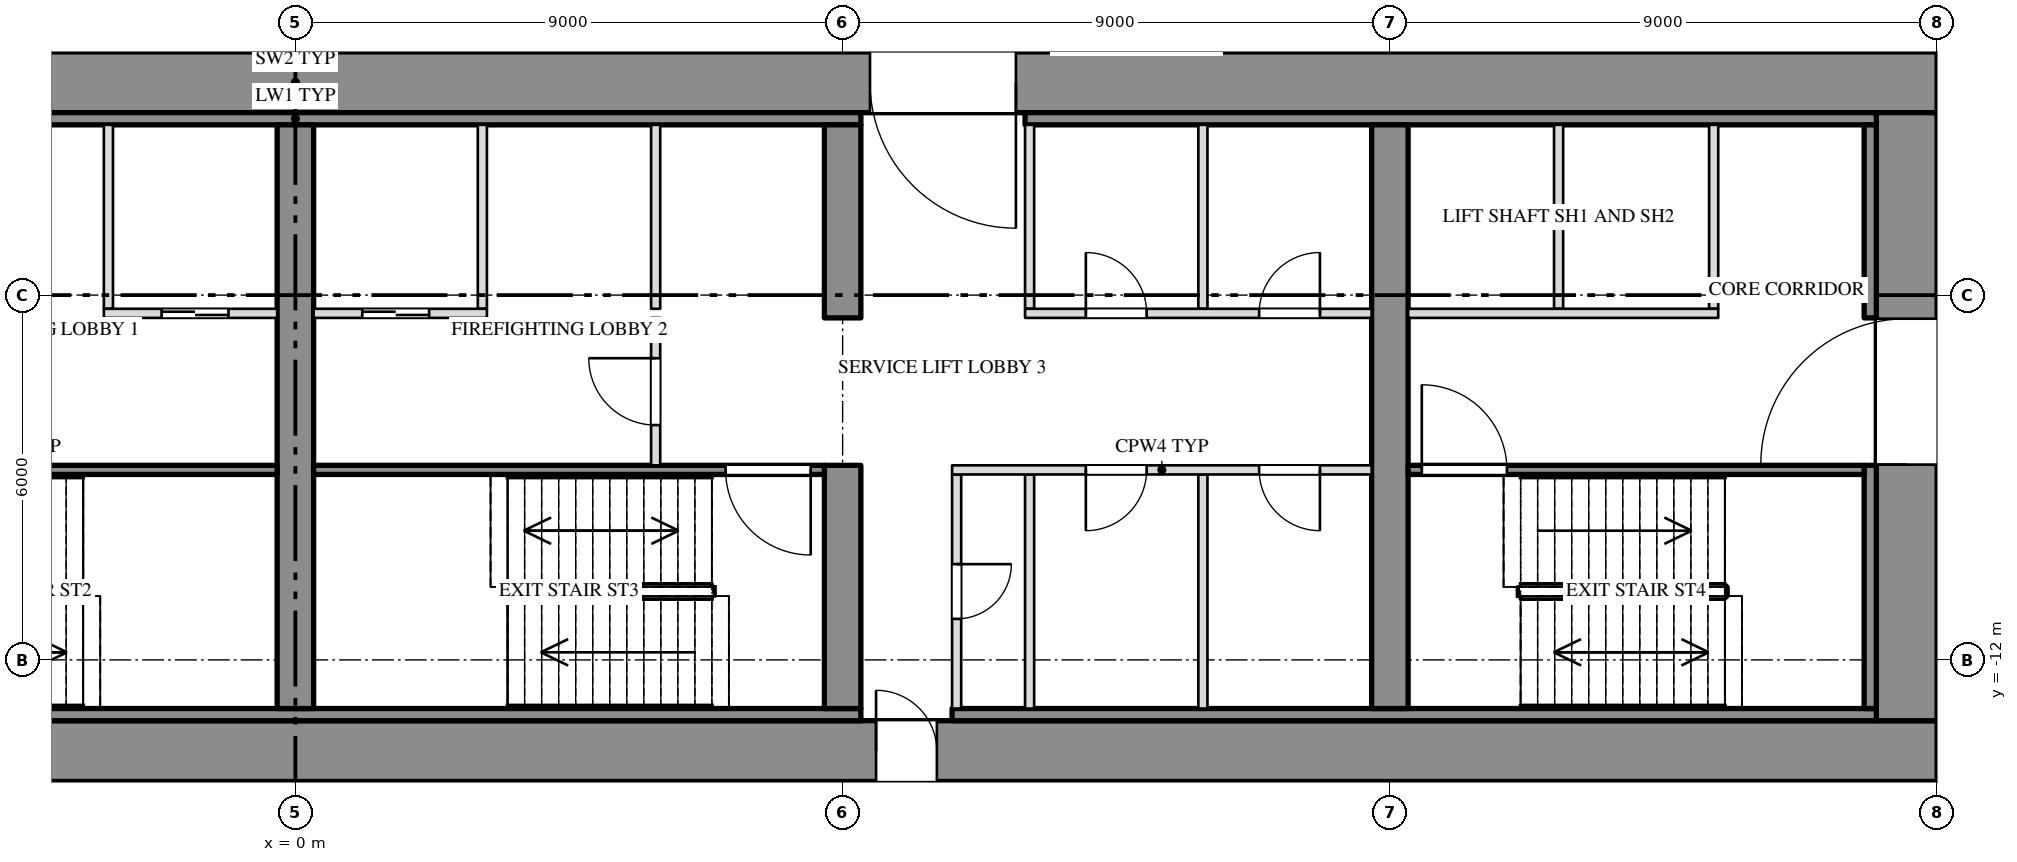
"""IFC4 building model, lengths in metres.
Left out: names, types, materials, properties, quantities, classifications, styles, units other than length and angle.
Written with IfcOpenShell. Run it as: python <this file> out.ifc"""

import sys

from ifc_helpers import new_model, si_unit, direction, frame, frame_2d, origin, place, context, subcontext, project, spatial, rectangle, extrude, element, fill, save


model = new_model("IFC4")
c1 = context("Model", 3, precision=1e-05, world=origin(), true_north=direction((0.0, 1.0)))
c2 = subcontext(c1, "Body", "Model", "MODEL_VIEW")
j1 = project(units=[si_unit("LENGTHUNIT", "METRE"), si_unit("PLANEANGLEUNIT", "RADIAN")], contexts=[c1])
p1 = place(None, origin())
s1 = spatial("IfcSite", under=j1, at=p1, CompositionType="ELEMENT")
p2 = place(p1, origin())
s2 = spatial("IfcBuilding", under=s1, at=p2, CompositionType="ELEMENT")
p3 = place(p2, frame((0.0, 0.0, 104.5)))
s3 = spatial("IfcBuildingStorey", under=s2, at=p3, CompositionType="ELEMENT", Elevation=104.5)
p4 = place(p3, frame((-27.0, -2.5, 0.0), z_axis=(0.0, 0.0, 1.0), x_axis=(1.0, 0.0, 0.0)))
e1 = element("IfcWall", 1, at=p4, inside=s3, PredefinedType="SHEAR", context=c2, shape_type="SweptSolid", body=[
    extrude(rectangle(XDim=54.0, YDim=1.0, at=frame_2d((27.0, 0.0))), origin(), (0.0, 0.0, 1.0), 3.8),
])
p5 = place(p4, frame((15.15, 0.0, 0.0)))
e2 = element("IfcOpeningElement", 2, at=p5, cuts=e1, PredefinedType="OPENING", context=c2, shape_type="SweptSolid", body=[
    extrude(rectangle(XDim=2.4, YDim=2.1, at=frame_2d((1.2, 1.05))), frame((0.0, 0.512, 0.0), z_axis=(0.0, -1.0, 0.0), x_axis=(1.0, 0.0, 0.0)), (0.0, 0.0, 1.0), 1.024),
])
p6 = place(p4, frame((36.45, 0.0, 0.0)))
e3 = element("IfcOpeningElement", 3, at=p6, cuts=e1, PredefinedType="OPENING", context=c2, shape_type="SweptSolid", body=[
    extrude(rectangle(XDim=2.4, YDim=2.1, at=frame_2d((1.2, 1.05))), frame((0.0, 0.512, 0.0), z_axis=(0.0, -1.0, 0.0), x_axis=(1.0, 0.0, 0.0)), (0.0, 0.0, 1.0), 1.024),
])
p7 = place(p3, frame((-27.0, -13.5, 0.0), z_axis=(0.0, 0.0, 1.0), x_axis=(1.0, 0.0, 0.0)))
e4 = element("IfcWall", 4, at=p7, inside=s3, PredefinedType="SHEAR", context=c2, shape_type="SweptSolid", body=[
    extrude(rectangle(XDim=54.0, YDim=1.0, at=frame_2d((27.0, 0.0))), origin(), (0.0, 0.0, 1.0), 3.8),
])
p8 = place(p7, frame((16.45, 0.0, 0.0)))
e5 = element("IfcOpeningElement", 5, at=p8, cuts=e4, PredefinedType="OPENING", context=c2, shape_type="SweptSolid", body=[
    extrude(rectangle(XDim=1.0, YDim=2.1, at=frame_2d((0.5, 1.05))), frame((0.0, 0.512, 0.0), z_axis=(0.0, -1.0, 0.0), x_axis=(1.0, 0.0, 0.0)), (0.0, 0.0, 1.0), 1.024),
])
p9 = place(p7, frame((36.55, 0.0, 0.0)))
e6 = element("IfcOpeningElement", 6, at=p9, cuts=e4, PredefinedType="OPENING", context=c2, shape_type="SweptSolid", body=[
    extrude(rectangle(XDim=1.0, YDim=2.1, at=frame_2d((0.5, 1.05))), frame((0.0, 0.512, 0.0), z_axis=(0.0, -1.0, 0.0), x_axis=(1.0, 0.0, 0.0)), (0.0, 0.0, 1.0), 1.024),
])
p10 = place(p3, frame((26.5, -13.0, 0.0), z_axis=(0.0, 0.0, 1.0), x_axis=(0.0, 1.0, 0.0)))
e7 = element("IfcWall", 7, at=p10, inside=s3, PredefinedType="SHEAR", context=c2, shape_type="SweptSolid", body=[
    extrude(rectangle(XDim=10.0, YDim=1.0, at=frame_2d((5.0, 0.0))), origin(), (0.0, 0.0, 1.0), 3.8),
])
p11 = place(p10, frame((4.212, 0.0, 0.0)))
e8 = element("IfcOpeningElement", 8, at=p11, cuts=e7, PredefinedType="OPENING", context=c2, shape_type="SweptSolid", body=[
    extrude(rectangle(XDim=2.4, YDim=2.1, at=frame_2d((1.2, 1.05))), frame((0.0, 0.512, 0.0), z_axis=(0.0, -1.0, 0.0), x_axis=(1.0, 0.0, 0.0)), (0.0, 0.0, 1.0), 1.024),
])
p12 = place(p3, frame((-9.3, -3.1, 0.0), z_axis=(0.0, 0.0, 1.0), x_axis=(1.0, 0.0, 0.0)))
e9 = element("IfcWall", 9, at=p12, inside=s3, PredefinedType="SHEAR", context=c2, shape_type="SweptSolid", body=[
    extrude(rectangle(XDim=18.6, YDim=0.2, at=frame_2d((9.3, 0.0))), origin(), (0.0, 0.0, 1.0), 3.8),
])
p13 = place(p3, frame((12.0, -3.1, 0.0), z_axis=(0.0, 0.0, 1.0), x_axis=(1.0, 0.0, 0.0)))
e10 = element("IfcWall", 10, at=p13, inside=s3, PredefinedType="SHEAR", context=c2, shape_type="SweptSolid", body=[
    extrude(rectangle(XDim=14.0, YDim=0.2, at=frame_2d((7.0, 0.0))), origin(), (0.0, 0.0, 1.0), 3.8),
])
p14 = place(p3, frame((-9.3, -12.9, 0.0), z_axis=(0.0, 0.0, 1.0), x_axis=(1.0, 0.0, 0.0)))
e11 = element("IfcWall", 11, at=p14, inside=s3, PredefinedType="SHEAR", context=c2, shape_type="SweptSolid", body=[
    extrude(rectangle(XDim=18.6, YDim=0.2, at=frame_2d((9.3, 0.0))), origin(), (0.0, 0.0, 1.0), 3.8),
])
p15 = place(p3, frame((10.8, -12.9, 0.0), z_axis=(0.0, 0.0, 1.0), x_axis=(1.0, 0.0, 0.0)))
e12 = element("IfcWall", 12, at=p15, inside=s3, PredefinedType="SHEAR", context=c2, shape_type="SweptSolid", body=[
    extrude(rectangle(XDim=15.2, YDim=0.2, at=frame_2d((7.6, 0.0))), origin(), (0.0, 0.0, 1.0), 3.8),
])
p16 = place(p3, frame((25.9, -12.8, 0.0), z_axis=(0.0, 0.0, 1.0), x_axis=(0.0, 1.0, 0.0)))
e13 = element("IfcWall", 13, at=p16, inside=s3, PredefinedType="SHEAR", context=c2, shape_type="SweptSolid", body=[
    extrude(rectangle(XDim=4.0, YDim=0.2, at=frame_2d((2.0, 0.0))), origin(), (0.0, 0.0, 1.0), 3.8),
])
p17 = place(p3, frame((25.9, -6.375, 0.0), z_axis=(0.0, 0.0, 1.0), x_axis=(0.0, 1.0, 0.0)))
e14 = element("IfcWall", 14, at=p17, inside=s3, PredefinedType="SHEAR", context=c2, shape_type="SweptSolid", body=[
    extrude(rectangle(XDim=3.175, YDim=0.2, at=frame_2d((1.587, 0.0))), origin(), (0.0, 0.0, 1.0), 3.8),
])
p18 = place(p3, frame((0.0, -12.8, 0.0), z_axis=(0.0, 0.0, 1.0), x_axis=(0.0, 1.0, 0.0)))
e15 = element("IfcWall", 15, at=p18, inside=s3, PredefinedType="SHEAR", context=c2, shape_type="SweptSolid", body=[
    extrude(rectangle(XDim=9.6, YDim=0.6, at=frame_2d((4.8, 0.0))), origin(), (0.0, 0.0, 1.0), 3.8),
])
p19 = place(p3, frame((9.0, -12.8, 0.0), z_axis=(0.0, 0.0, 1.0), x_axis=(0.0, 1.0, 0.0)))
e16 = element("IfcWall", 16, at=p19, inside=s3, PredefinedType="SHEAR", context=c2, shape_type="SweptSolid", body=[
    extrude(rectangle(XDim=4.0, YDim=0.6, at=frame_2d((2.0, 0.0))), origin(), (0.0, 0.0, 1.0), 3.8),
])
p20 = place(p3, frame((9.0, -6.375, 0.0), z_axis=(0.0, 0.0, 1.0), x_axis=(0.0, 1.0, 0.0)))
e17 = element("IfcWall", 17, at=p20, inside=s3, PredefinedType="SHEAR", context=c2, shape_type="SweptSolid", body=[
    extrude(rectangle(XDim=3.175, YDim=0.6, at=frame_2d((1.587, 0.0))), origin(), (0.0, 0.0, 1.0), 3.8),
])
p21 = place(p3, frame((18.0, -12.8, 0.0), z_axis=(0.0, 0.0, 1.0), x_axis=(0.0, 1.0, 0.0)))
e18 = element("IfcWall", 18, at=p21, inside=s3, PredefinedType="SHEAR", context=c2, shape_type="SweptSolid", body=[
    extrude(rectangle(XDim=9.6, YDim=0.6, at=frame_2d((4.8, 0.0))), origin(), (0.0, 0.0, 1.0), 3.8),
])
for number, where, z_axis, x_axis in (
    (19, (-3.075, -6.225, 0.0), (0.0, 0.0, 1.0), (0.0, 1.0, 0.0)),
    (20, (3.075, -6.225, 0.0), (0.0, 0.0, 1.0), (0.0, 1.0, 0.0)),
    (21, (5.925, -6.225, 0.0), (0.0, 0.0, 1.0), (0.0, 1.0, 0.0)),
    (22, (12.075, -6.225, 0.0), (0.0, 0.0, 1.0), (0.0, 1.0, 0.0)),
    (23, (14.925, -6.225, 0.0), (0.0, 0.0, 1.0), (0.0, 1.0, 0.0)),
    (24, (20.775, -6.225, 0.0), (0.0, 0.0, 1.0), (0.0, 1.0, 0.0)),
    (25, (23.325, -6.225, 0.0), (0.0, 0.0, 1.0), (0.0, 1.0, 0.0)),
):
    element("IfcWall", number, at=place(p3, frame(where, z_axis=z_axis, x_axis=x_axis)), inside=s3, PredefinedType="PARTITIONING", context=c2, shape_type="SweptSolid", body=[
        extrude(rectangle(XDim=3.025, YDim=0.15, at=frame_2d((1.513, 0.0))), origin(), (0.0, 0.0, 1.0), 3.8),
    ])
p22 = place(p3, frame((10.875, -12.8, 0.0), z_axis=(0.0, 0.0, 1.0), x_axis=(0.0, 1.0, 0.0)))
e26 = element("IfcWall", 26, at=p22, inside=s3, PredefinedType="PARTITIONING", context=c2, shape_type="SweptSolid", body=[
    extrude(rectangle(XDim=3.85, YDim=0.15, at=frame_2d((1.925, 0.0))), origin(), (0.0, 0.0, 1.0), 3.8),
])
p23 = place(p22, frame((1.475, 0.0, 0.0)))
e27 = element("IfcOpeningElement", 27, at=p23, cuts=e26, PredefinedType="OPENING", context=c2, shape_type="SweptSolid", body=[
    extrude(rectangle(XDim=0.9, YDim=2.1, at=frame_2d((0.45, 1.05))), frame((0.0, 0.087, 0.0), z_axis=(0.0, -1.0, 0.0), x_axis=(1.0, 0.0, 0.0)), (0.0, 0.0, 1.0), 0.174),
])
for number, where, z_axis, x_axis in (
    (28, (12.075, -12.8, 0.0), (0.0, 0.0, 1.0), (0.0, 1.0, 0.0)),
    (29, (14.925, -12.8, 0.0), (0.0, 0.0, 1.0), (0.0, 1.0, 0.0)),
):
    element("IfcWall", number, at=place(p3, frame(where, z_axis=z_axis, x_axis=x_axis)), inside=s3, PredefinedType="PARTITIONING", context=c2, shape_type="SweptSolid", body=[
        extrude(rectangle(XDim=3.85, YDim=0.15, at=frame_2d((1.925, 0.0))), origin(), (0.0, 0.0, 1.0), 3.8),
    ])
p24 = place(p3, frame((5.925, -8.8, 0.0), z_axis=(0.0, 0.0, 1.0), x_axis=(0.0, 1.0, 0.0)))
e30 = element("IfcWall", 30, at=p24, inside=s3, PredefinedType="PARTITIONING", context=c2, shape_type="SweptSolid", body=[
    extrude(rectangle(XDim=2.425, YDim=0.15, at=frame_2d((1.212, 0.0))), origin(), (0.0, 0.0, 1.0), 3.8),
])
p25 = place(p24, frame((0.662, 0.0, 0.0)))
e31 = element("IfcOpeningElement", 31, at=p25, cuts=e30, PredefinedType="OPENING", context=c2, shape_type="SweptSolid", body=[
    extrude(rectangle(XDim=1.1, YDim=2.1, at=frame_2d((0.55, 1.05))), frame((0.0, 0.087, 0.0), z_axis=(0.0, -1.0, 0.0), x_axis=(1.0, 0.0, 0.0)), (0.0, 0.0, 1.0), 0.174),
])
p26 = place(p3, frame((-3.15, -6.3, 0.0), z_axis=(0.0, 0.0, 1.0), x_axis=(1.0, 0.0, 0.0)))
e32 = element("IfcWall", 32, at=p26, inside=s3, PredefinedType="PARTITIONING", context=c2, shape_type="SweptSolid", body=[
    extrude(rectangle(XDim=2.85, YDim=0.15, at=frame_2d((1.425, 0.0))), origin(), (0.0, 0.0, 1.0), 3.8),
])
p27 = place(p26, frame((0.95, 0.0, 0.0)))
e33 = element("IfcOpeningElement", 33, at=p27, cuts=e32, PredefinedType="OPENING", context=c2, shape_type="SweptSolid", body=[
    extrude(rectangle(XDim=1.1, YDim=2.1, at=frame_2d((0.55, 1.05))), frame((0.0, 0.087, 0.0), z_axis=(0.0, -1.0, 0.0), x_axis=(1.0, 0.0, 0.0)), (0.0, 0.0, 1.0), 0.174),
])
p28 = place(p3, frame((0.3, -6.3, 0.0), z_axis=(0.0, 0.0, 1.0), x_axis=(1.0, 0.0, 0.0)))
e34 = element("IfcWall", 34, at=p28, inside=s3, PredefinedType="PARTITIONING", context=c2, shape_type="SweptSolid", body=[
    extrude(rectangle(XDim=2.85, YDim=0.15, at=frame_2d((1.425, 0.0))), origin(), (0.0, 0.0, 1.0), 3.8),
])
p29 = place(p28, frame((0.8, 0.0, 0.0)))
e35 = element("IfcOpeningElement", 35, at=p29, cuts=e34, PredefinedType="OPENING", context=c2, shape_type="SweptSolid", body=[
    extrude(rectangle(XDim=1.1, YDim=2.1, at=frame_2d((0.55, 1.05))), frame((0.0, 0.087, 0.0), z_axis=(0.0, -1.0, 0.0), x_axis=(1.0, 0.0, 0.0)), (0.0, 0.0, 1.0), 0.174),
])
p30 = place(p3, frame((12.0, -6.3, 0.0), z_axis=(0.0, 0.0, 1.0), x_axis=(1.0, 0.0, 0.0)))
e36 = element("IfcWall", 36, at=p30, inside=s3, PredefinedType="PARTITIONING", context=c2, shape_type="SweptSolid", body=[
    extrude(rectangle(XDim=5.7, YDim=0.15, at=frame_2d((2.85, 0.0))), origin(), (0.0, 0.0, 1.0), 3.8),
])
p31 = place(p30, frame((1.0, 0.0, 0.0)))
e37 = element("IfcOpeningElement", 37, at=p31, cuts=e36, PredefinedType="OPENING", context=c2, shape_type="SweptSolid", body=[
    extrude(rectangle(XDim=1.0, YDim=2.1, at=frame_2d((0.5, 1.05))), frame((0.0, 0.087, 0.0), z_axis=(0.0, -1.0, 0.0), x_axis=(1.0, 0.0, 0.0)), (0.0, 0.0, 1.0), 0.174),
])
p32 = place(p30, frame((3.85, 0.0, 0.0)))
e38 = element("IfcOpeningElement", 38, at=p32, cuts=e36, PredefinedType="OPENING", context=c2, shape_type="SweptSolid", body=[
    extrude(rectangle(XDim=1.0, YDim=2.1, at=frame_2d((0.5, 1.05))), frame((0.0, 0.087, 0.0), z_axis=(0.0, -1.0, 0.0), x_axis=(1.0, 0.0, 0.0)), (0.0, 0.0, 1.0), 0.174),
])
p33 = place(p3, frame((18.3, -6.3, 0.0), z_axis=(0.0, 0.0, 1.0), x_axis=(1.0, 0.0, 0.0)))
e39 = element("IfcWall", 39, at=p33, inside=s3, PredefinedType="PARTITIONING", context=c2, shape_type="SweptSolid", body=[
    extrude(rectangle(XDim=5.1, YDim=0.15, at=frame_2d((2.55, 0.0))), origin(), (0.0, 0.0, 1.0), 3.8),
])
p34 = place(p3, frame((-8.7, -8.875, 0.0), z_axis=(0.0, 0.0, 1.0), x_axis=(1.0, 0.0, 0.0)))
e40 = element("IfcWall", 40, at=p34, inside=s3, PredefinedType="SHEAR", context=c2, shape_type="SweptSolid", body=[
    extrude(rectangle(XDim=8.4, YDim=0.15, at=frame_2d((4.2, 0.0))), origin(), (0.0, 0.0, 1.0), 3.8),
])
p35 = place(p34, frame((0.225, 0.0, 0.0)))
e41 = element("IfcOpeningElement", 41, at=p35, cuts=e40, PredefinedType="OPENING", context=c2, shape_type="SweptSolid", body=[
    extrude(rectangle(XDim=1.4, YDim=2.1, at=frame_2d((0.7, 1.05))), frame((0.0, 0.087, 0.0), z_axis=(0.0, -1.0, 0.0), x_axis=(1.0, 0.0, 0.0)), (0.0, 0.0, 1.0), 0.174),
])
p36 = place(p3, frame((0.3, -8.875, 0.0), z_axis=(0.0, 0.0, 1.0), x_axis=(1.0, 0.0, 0.0)))
e42 = element("IfcWall", 42, at=p36, inside=s3, PredefinedType="SHEAR", context=c2, shape_type="SweptSolid", body=[
    extrude(rectangle(XDim=8.4, YDim=0.15, at=frame_2d((4.2, 0.0))), origin(), (0.0, 0.0, 1.0), 3.8),
])
p37 = place(p36, frame((6.775, 0.0, 0.0)))
e43 = element("IfcOpeningElement", 43, at=p37, cuts=e42, PredefinedType="OPENING", context=c2, shape_type="SweptSolid", body=[
    extrude(rectangle(XDim=1.4, YDim=2.1, at=frame_2d((0.7, 1.05))), frame((0.0, 0.087, 0.0), z_axis=(0.0, -1.0, 0.0), x_axis=(1.0, 0.0, 0.0)), (0.0, 0.0, 1.0), 0.174),
])
p38 = place(p3, frame((10.8, -8.875, 0.0), z_axis=(0.0, 0.0, 1.0), x_axis=(1.0, 0.0, 0.0)))
e44 = element("IfcWall", 44, at=p38, inside=s3, PredefinedType="PARTITIONING", context=c2, shape_type="SweptSolid", body=[
    extrude(rectangle(XDim=6.9, YDim=0.15, at=frame_2d((3.45, 0.0))), origin(), (0.0, 0.0, 1.0), 3.8),
])
p39 = place(p38, frame((2.2, 0.0, 0.0)))
e45 = element("IfcOpeningElement", 45, at=p39, cuts=e44, PredefinedType="OPENING", context=c2, shape_type="SweptSolid", body=[
    extrude(rectangle(XDim=1.0, YDim=2.1, at=frame_2d((0.5, 1.05))), frame((0.0, 0.087, 0.0), z_axis=(0.0, -1.0, 0.0), x_axis=(1.0, 0.0, 0.0)), (0.0, 0.0, 1.0), 0.174),
])
p40 = place(p38, frame((5.05, 0.0, 0.0)))
e46 = element("IfcOpeningElement", 46, at=p40, cuts=e44, PredefinedType="OPENING", context=c2, shape_type="SweptSolid", body=[
    extrude(rectangle(XDim=1.0, YDim=2.1, at=frame_2d((0.5, 1.05))), frame((0.0, 0.087, 0.0), z_axis=(0.0, -1.0, 0.0), x_axis=(1.0, 0.0, 0.0)), (0.0, 0.0, 1.0), 0.174),
])
p41 = place(p3, frame((18.3, -8.875, 0.0), z_axis=(0.0, 0.0, 1.0), x_axis=(1.0, 0.0, 0.0)))
e47 = element("IfcWall", 47, at=p41, inside=s3, PredefinedType="SHEAR", context=c2, shape_type="SweptSolid", body=[
    extrude(rectangle(XDim=7.5, YDim=0.15, at=frame_2d((3.75, 0.0))), origin(), (0.0, 0.0, 1.0), 3.8),
])
p42 = place(p41, frame((0.225, 0.0, 0.0)))
e48 = element("IfcOpeningElement", 48, at=p42, cuts=e47, PredefinedType="OPENING", context=c2, shape_type="SweptSolid", body=[
    extrude(rectangle(XDim=1.4, YDim=2.1, at=frame_2d((0.7, 1.05))), frame((0.0, 0.087, 0.0), z_axis=(0.0, -1.0, 0.0), x_axis=(1.0, 0.0, 0.0)), (0.0, 0.0, 1.0), 0.174),
])
p43 = place(p27, origin())
e49 = element("IfcDoor", 49, at=p43, inside=s3, OperationType="SLIDING_TO_RIGHT", PredefinedType="DOOR", context=c2, shape_type="SweptSolid", body=[
    extrude(rectangle(XDim=1.1, YDim=2.1, at=frame_2d((0.55, 1.05))), frame((0.0, 0.025, 0.0), z_axis=(0.0, -1.0, 0.0), x_axis=(1.0, 0.0, 0.0)), (0.0, 0.0, 1.0), 0.05),
])
fill(e33, e49)
p44 = place(p29, origin())
e50 = element("IfcDoor", 50, at=p44, inside=s3, OperationType="SLIDING_TO_LEFT", PredefinedType="DOOR", context=c2, shape_type="SweptSolid", body=[
    extrude(rectangle(XDim=1.1, YDim=2.1, at=frame_2d((0.55, 1.05))), frame((0.0, 0.025, 0.0), z_axis=(0.0, -1.0, 0.0), x_axis=(1.0, 0.0, 0.0)), (0.0, 0.0, 1.0), 0.05),
])
fill(e35, e50)
p45 = place(p25, origin())
e51 = element("IfcDoor", 51, at=p45, inside=s3, OperationType="SINGLE_SWING_RIGHT", PredefinedType="DOOR", context=c2, shape_type="SweptSolid", body=[
    extrude(rectangle(XDim=1.1, YDim=2.1, at=frame_2d((0.55, 1.05))), frame((0.0, 0.025, 0.0), z_axis=(0.0, -1.0, 0.0), x_axis=(1.0, 0.0, 0.0)), (0.0, 0.0, 1.0), 0.05),
])
fill(e31, e51)
p46 = place(p37, origin())
e52 = element("IfcDoor", 52, at=p46, inside=s3, OperationType="DOUBLE_DOOR_SINGLE_SWING", PredefinedType="DOOR", context=c2, shape_type="SweptSolid", body=[
    extrude(rectangle(XDim=1.4, YDim=2.1, at=frame_2d((0.7, 1.05))), frame((0.0, 0.025, 0.0), z_axis=(0.0, -1.0, 0.0), x_axis=(1.0, 0.0, 0.0)), (0.0, 0.0, 1.0), 0.05),
])
fill(e43, e52)
p47 = place(p9, origin())
e53 = element("IfcDoor", 53, at=p47, inside=s3, OperationType="SINGLE_SWING_LEFT", PredefinedType="DOOR", context=c2, shape_type="SweptSolid", body=[
    extrude(rectangle(XDim=1.0, YDim=2.1, at=frame_2d((0.5, 1.05))), frame((0.0, 0.025, 0.0), z_axis=(0.0, -1.0, 0.0), x_axis=(1.0, 0.0, 0.0)), (0.0, 0.0, 1.0), 0.05),
])
fill(e6, e53)
p48 = place(p6, origin())
e54 = element("IfcDoor", 54, at=p48, inside=s3, OperationType="DOUBLE_DOOR_SINGLE_SWING", PredefinedType="DOOR", context=c2, shape_type="SweptSolid", body=[
    extrude(rectangle(XDim=2.4, YDim=2.1, at=frame_2d((1.2, 1.05))), frame((0.0, 0.025, 0.0), z_axis=(0.0, -1.0, 0.0), x_axis=(1.0, 0.0, 0.0)), (0.0, 0.0, 1.0), 0.05),
])
fill(e3, e54)
p49 = place(p23, origin())
e55 = element("IfcDoor", 55, at=p49, inside=s3, OperationType="SINGLE_SWING_LEFT", PredefinedType="DOOR", context=c2, shape_type="SweptSolid", body=[
    extrude(rectangle(XDim=0.9, YDim=2.1, at=frame_2d((0.45, 1.05))), frame((0.0, 0.025, 0.0), z_axis=(0.0, -1.0, 0.0), x_axis=(1.0, 0.0, 0.0)), (0.0, 0.0, 1.0), 0.05),
])
fill(e27, e55)
p50 = place(p39, origin())
e56 = element("IfcDoor", 56, at=p50, inside=s3, OperationType="SINGLE_SWING_RIGHT", PredefinedType="DOOR", context=c2, shape_type="SweptSolid", body=[
    extrude(rectangle(XDim=1.0, YDim=2.1, at=frame_2d((0.5, 1.05))), frame((0.0, 0.025, 0.0), z_axis=(0.0, -1.0, 0.0), x_axis=(1.0, 0.0, 0.0)), (0.0, 0.0, 1.0), 0.05),
])
fill(e45, e56)
p51 = place(p31, origin())
e57 = element("IfcDoor", 57, at=p51, inside=s3, OperationType="SINGLE_SWING_LEFT", PredefinedType="DOOR", context=c2, shape_type="SweptSolid", body=[
    extrude(rectangle(XDim=1.0, YDim=2.1, at=frame_2d((0.5, 1.05))), frame((0.0, 0.025, 0.0), z_axis=(0.0, -1.0, 0.0), x_axis=(1.0, 0.0, 0.0)), (0.0, 0.0, 1.0), 0.05),
])
fill(e37, e57)
p52 = place(p40, origin())
e58 = element("IfcDoor", 58, at=p52, inside=s3, OperationType="SINGLE_SWING_LEFT", PredefinedType="DOOR", context=c2, shape_type="SweptSolid", body=[
    extrude(rectangle(XDim=1.0, YDim=2.1, at=frame_2d((0.5, 1.05))), frame((0.0, 0.025, 0.0), z_axis=(0.0, -1.0, 0.0), x_axis=(1.0, 0.0, 0.0)), (0.0, 0.0, 1.0), 0.05),
])
fill(e46, e58)
p53 = place(p32, origin())
e59 = element("IfcDoor", 59, at=p53, inside=s3, OperationType="SINGLE_SWING_RIGHT", PredefinedType="DOOR", context=c2, shape_type="SweptSolid", body=[
    extrude(rectangle(XDim=1.0, YDim=2.1, at=frame_2d((0.5, 1.05))), frame((0.0, 0.025, 0.0), z_axis=(0.0, -1.0, 0.0), x_axis=(1.0, 0.0, 0.0)), (0.0, 0.0, 1.0), 0.05),
])
fill(e38, e59)
p54 = place(p42, origin())
e60 = element("IfcDoor", 60, at=p54, inside=s3, OperationType="DOUBLE_DOOR_SINGLE_SWING", PredefinedType="DOOR", context=c2, shape_type="SweptSolid", body=[
    extrude(rectangle(XDim=1.4, YDim=2.1, at=frame_2d((0.7, 1.05))), frame((0.0, 0.025, 0.0), z_axis=(0.0, -1.0, 0.0), x_axis=(1.0, 0.0, 0.0)), (0.0, 0.0, 1.0), 0.05),
])
fill(e48, e60)
p55 = place(p11, origin())
e61 = element("IfcDoor", 61, at=p55, inside=s3, OperationType="DOUBLE_DOOR_SINGLE_SWING", PredefinedType="DOOR", context=c2, shape_type="SweptSolid", body=[
    extrude(rectangle(XDim=2.4, YDim=2.1, at=frame_2d((1.2, 1.05))), frame((0.0, 0.025, 0.0), z_axis=(0.0, -1.0, 0.0), x_axis=(1.0, 0.0, 0.0)), (0.0, 0.0, 1.0), 0.05),
])
fill(e8, e61)
save(model, sys.argv[1])
